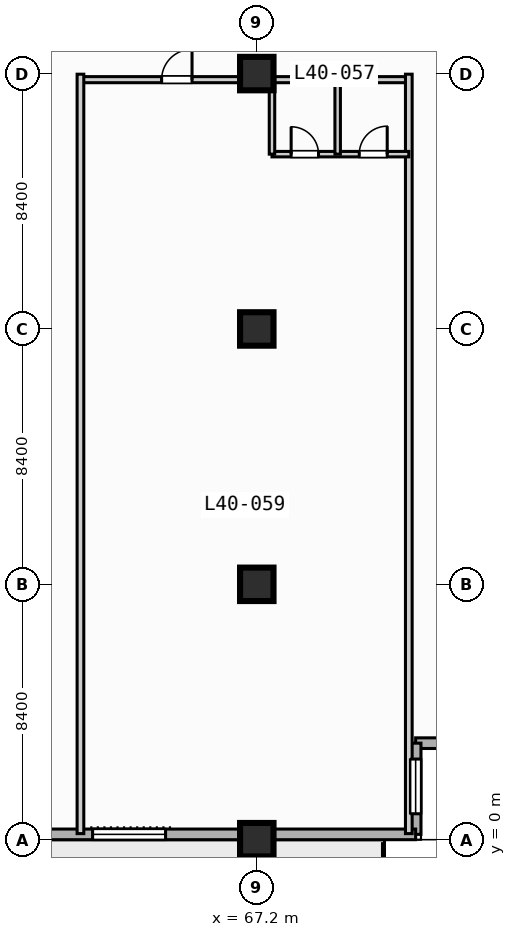
"""IFC4 building model, lengths in metres.
Left out: names, types, materials, properties, quantities, classifications, styles, units other than length and angle.
Written with IfcOpenShell. Run it as: python <this file> out.ifc"""

import sys

from ifc_helpers import new_model, si_unit, direction, frame, frame_2d, origin, origin_2d, place, context, subcontext, project, spatial, rectangle, extrude, element, fill, save


model = new_model("IFC4")
c1 = context("Model", 3, precision=1e-05, world=origin(), true_north=direction((0.0, 1.0)))
c2 = subcontext(c1, "Body", "Model", "MODEL_VIEW")
j1 = project(units=[si_unit("LENGTHUNIT", "METRE"), si_unit("PLANEANGLEUNIT", "RADIAN")], contexts=[c1])
p1 = place(None, origin())
s1 = spatial("IfcSite", under=j1, at=p1, CompositionType="ELEMENT")
p2 = place(p1, origin())
s2 = spatial("IfcBuilding", under=s1, at=p2, CompositionType="ELEMENT")
p3 = place(p2, frame((0.0, 0.0, 168.0)))
s3 = spatial("IfcBuildingStorey", under=s2, at=p3, CompositionType="ELEMENT", Elevation=168.0)
for number, where, z_axis, x_axis in (
    (1, (67.2, 0.0, 0.0), (0.0, 0.0, 1.0), (1.0, 0.0, 0.0)),
    (2, (67.2, 8.4, 0.0), (0.0, 0.0, 1.0), (1.0, 0.0, 0.0)),
    (3, (67.2, 16.8, 0.0), (0.0, 0.0, 1.0), (1.0, 0.0, 0.0)),
    (4, (67.2, 25.2, 0.0), (0.0, 0.0, 1.0), (1.0, 0.0, 0.0)),
):
    element("IfcColumn", number, at=place(p3, frame(where, z_axis=z_axis, x_axis=x_axis)), inside=s3, PredefinedType="COLUMN", context=c2, shape_type="SweptSolid", body=[
        extrude(rectangle(XDim=1.1, YDim=1.1, at=origin_2d()), origin(), (0.0, 0.0, 1.0), 3.7),
    ])
p4 = place(p3, frame((75.425, 3.175, 0.0), z_axis=(0.0, 0.0, 1.0), x_axis=(-1.0, 0.0, 0.0)))
e5 = element("IfcWall", 5, at=p4, inside=s3, PredefinedType="STANDARD", context=c2, shape_type="SweptSolid", body=[
    extrude(rectangle(XDim=3.0, YDim=0.35, at=frame_2d((1.5, 0.0))), origin(), (0.0, 0.0, 1.0), 3.47),
])
p5 = place(p3, frame((72.425, 3.175, 0.0), z_axis=(0.0, 0.0, 1.0), x_axis=(0.0, -1.0, 0.0)))
e6 = element("IfcWall", 6, at=p5, inside=s3, PredefinedType="STANDARD", context=c2, shape_type="SweptSolid", body=[
    extrude(rectangle(XDim=3.0, YDim=0.35, at=frame_2d((1.5, 0.0))), origin(), (0.0, 0.0, 1.0), 3.47),
])
p6 = place(p5, frame((0.522, 0.0, 0.85)))
e7 = element("IfcOpeningElement", 7, at=p6, cuts=e6, PredefinedType="OPENING", context=c2, shape_type="SweptSolid", body=[
    extrude(rectangle(XDim=1.8, YDim=1.8, at=frame_2d((0.9, 0.9))), frame((0.0, 0.185, 0.0), z_axis=(0.0, -1.0, 0.0), x_axis=(1.0, 0.0, 0.0)), (0.0, 0.0, 1.0), 0.37),
])
p7 = place(p3, frame((72.425, 0.175, 0.0), z_axis=(0.0, 0.0, 1.0), x_axis=(-1.0, 0.0, 0.0)))
e8 = element("IfcWall", 8, at=p7, inside=s3, PredefinedType="STANDARD", context=c2, shape_type="SweptSolid", body=[
    extrude(rectangle(XDim=69.25, YDim=0.35, at=frame_2d((34.625, 0.0))), origin(), (0.0, 0.0, 1.0), 3.47),
])
p8 = place(p7, frame((51.725, 0.0, 0.0)))
e9 = element("IfcOpeningElement", 9, at=p8, cuts=e8, PredefinedType="OPENING", context=c2, shape_type="SweptSolid", body=[
    extrude(rectangle(XDim=1.4, YDim=2.2, at=frame_2d((0.7, 1.1))), frame((0.0, 0.185, 0.0), z_axis=(0.0, -1.0, 0.0), x_axis=(1.0, 0.0, 0.0)), (0.0, 0.0, 1.0), 0.37),
])
p9 = place(p7, frame((33.725, 0.0, 0.85)))
e10 = element("IfcOpeningElement", 10, at=p9, cuts=e8, PredefinedType="OPENING", context=c2, shape_type="SweptSolid", body=[
    extrude(rectangle(XDim=1.8, YDim=1.8, at=frame_2d((0.9, 0.9))), frame((0.0, 0.185, 0.0), z_axis=(0.0, -1.0, 0.0), x_axis=(1.0, 0.0, 0.0)), (0.0, 0.0, 1.0), 0.37),
])
p10 = place(p7, frame((25.025, 0.0, 0.85)))
e11 = element("IfcOpeningElement", 11, at=p10, cuts=e8, PredefinedType="OPENING", context=c2, shape_type="SweptSolid", body=[
    extrude(rectangle(XDim=2.4, YDim=1.95, at=frame_2d((1.2, 0.975))), frame((0.0, 0.185, 0.0), z_axis=(0.0, -1.0, 0.0), x_axis=(1.0, 0.0, 0.0)), (0.0, 0.0, 1.0), 0.37),
])
p11 = place(p7, frame((8.225, 0.0, 0.85)))
e12 = element("IfcOpeningElement", 12, at=p11, cuts=e8, PredefinedType="OPENING", context=c2, shape_type="SweptSolid", body=[
    extrude(rectangle(XDim=2.4, YDim=1.95, at=frame_2d((1.2, 0.975))), frame((0.0, 0.185, 0.0), z_axis=(0.0, -1.0, 0.0), x_axis=(1.0, 0.0, 0.0)), (0.0, 0.0, 1.0), 0.37),
])
p12 = place(p7, frame((64.725, 0.0, 0.85)))
e13 = element("IfcOpeningElement", 13, at=p12, cuts=e8, PredefinedType="OPENING", context=c2, shape_type="SweptSolid", body=[
    extrude(rectangle(XDim=1.8, YDim=1.8, at=frame_2d((0.9, 0.9))), frame((0.0, 0.185, 0.0), z_axis=(0.0, -1.0, 0.0), x_axis=(1.0, 0.0, 0.0)), (0.0, 0.0, 1.0), 0.37),
])
p13 = place(p7, frame((44.675, 0.0, 0.85)))
e14 = element("IfcOpeningElement", 14, at=p13, cuts=e8, PredefinedType="OPENING", context=c2, shape_type="SweptSolid", body=[
    extrude(rectangle(XDim=1.8, YDim=1.8, at=frame_2d((0.9, 0.9))), frame((0.0, 0.185, 0.0), z_axis=(0.0, -1.0, 0.0), x_axis=(1.0, 0.0, 0.0)), (0.0, 0.0, 1.0), 0.37),
])
p14 = place(p3, frame((61.4, 25.0, 0.0), z_axis=(0.0, 0.0, 1.0), x_axis=(1.0, 0.0, 0.0)))
e15 = element("IfcWall", 15, at=p14, inside=s3, PredefinedType="PARTITIONING", context=c2, shape_type="SweptSolid", body=[
    extrude(rectangle(XDim=10.8, YDim=0.2, at=frame_2d((5.4, 0.0))), origin(), (0.0, 0.0, 1.0), 2.82),
])
p15 = place(p14, frame((2.67, 0.0, 0.0)))
e16 = element("IfcOpeningElement", 16, at=p15, cuts=e15, PredefinedType="OPENING", context=c2, shape_type="SweptSolid", body=[
    extrude(rectangle(XDim=1.0, YDim=2.15, at=frame_2d((0.5, 1.075))), frame((0.0, 0.11, 0.0), z_axis=(0.0, -1.0, 0.0), x_axis=(1.0, 0.0, 0.0)), (0.0, 0.0, 1.0), 0.22),
])
for number, where, z_axis, x_axis in (
    (17, (61.4, 0.2, 0.0), (0.0, 0.0, 1.0), (0.0, 1.0, 0.0)),
    (18, (72.2, 0.2, 0.0), (0.0, 0.0, 1.0), (0.0, 1.0, 0.0)),
):
    element("IfcWall", number, at=place(p3, frame(where, z_axis=z_axis, x_axis=x_axis)), inside=s3, PredefinedType="PARTITIONING", context=c2, shape_type="SweptSolid", body=[
        extrude(rectangle(XDim=24.98, YDim=0.22, at=frame_2d((12.49, 0.0))), origin(), (0.0, 0.0, 1.0), 3.47),
    ])
p16 = place(p3, frame((67.7, 22.55, 0.0), z_axis=(0.0, 0.0, 1.0), x_axis=(1.0, 0.0, 0.0)))
e19 = element("IfcWall", 19, at=p16, inside=s3, PredefinedType="PLUMBINGWALL", context=c2, shape_type="SweptSolid", body=[
    extrude(rectangle(XDim=4.5, YDim=0.18, at=frame_2d((2.25, 0.0))), origin(), (0.0, 0.0, 1.0), 3.47),
])
p17 = place(p16, frame((0.63, 0.0, 0.0)))
e20 = element("IfcOpeningElement", 20, at=p17, cuts=e19, PredefinedType="OPENING", context=c2, shape_type="SweptSolid", body=[
    extrude(rectangle(XDim=0.9, YDim=2.1, at=frame_2d((0.45, 1.05))), frame((0.0, 0.1, 0.0), z_axis=(0.0, -1.0, 0.0), x_axis=(1.0, 0.0, 0.0)), (0.0, 0.0, 1.0), 0.2),
])
p18 = place(p16, frame((2.87, 0.0, 0.0)))
e21 = element("IfcOpeningElement", 21, at=p18, cuts=e19, PredefinedType="OPENING", context=c2, shape_type="SweptSolid", body=[
    extrude(rectangle(XDim=0.92, YDim=2.1, at=frame_2d((0.46, 1.05))), frame((0.0, 0.1, 0.0), z_axis=(0.0, -1.0, 0.0), x_axis=(1.0, 0.0, 0.0)), (0.0, 0.0, 1.0), 0.2),
])
for number, where, z_axis, x_axis in (
    (22, (67.7, 22.55, 0.0), (0.0, 0.0, 1.0), (0.0, 1.0, 0.0)),
    (23, (69.86, 22.55, 0.0), (0.0, 0.0, 1.0), (0.0, 1.0, 0.0)),
):
    element("IfcWall", number, at=place(p3, frame(where, z_axis=z_axis, x_axis=x_axis)), inside=s3, PredefinedType="PLUMBINGWALL", context=c2, shape_type="SweptSolid", body=[
        extrude(rectangle(XDim=2.45, YDim=0.18, at=frame_2d((1.225, 0.0))), origin(), (0.0, 0.0, 1.0), 3.47),
    ])
p19 = place(p6, origin())
e24 = element("IfcWindow", 24, at=p19, inside=s3, PartitioningType="SINGLE_PANEL", PredefinedType="WINDOW", context=c2, shape_type="SweptSolid", body=[
    extrude(rectangle(XDim=1.8, YDim=1.8, at=frame_2d((0.9, 0.9))), frame((0.0, 0.03, 0.0), z_axis=(0.0, -1.0, 0.0), x_axis=(1.0, 0.0, 0.0)), (0.0, 0.0, 1.0), 0.06),
])
fill(e7, e24)
p20 = place(p11, origin())
e25 = element("IfcWindow", 25, at=p20, inside=s3, PartitioningType="SINGLE_PANEL", PredefinedType="WINDOW", context=c2, shape_type="SweptSolid", body=[
    extrude(rectangle(XDim=2.4, YDim=1.95, at=frame_2d((1.2, 0.975))), frame((0.0, 0.03, 0.0), z_axis=(0.0, -1.0, 0.0), x_axis=(1.0, 0.0, 0.0)), (0.0, 0.0, 1.0), 0.06),
])
fill(e12, e25)
p21 = place(p15, origin())
e26 = element("IfcDoor", 26, at=p21, inside=s3, OperationType="SINGLE_SWING_RIGHT", PredefinedType="DOOR", context=c2, shape_type="SweptSolid", body=[
    extrude(rectangle(XDim=1.0, YDim=2.15, at=frame_2d((0.5, 1.075))), frame((0.0, 0.025, 0.0), z_axis=(0.0, -1.0, 0.0), x_axis=(1.0, 0.0, 0.0)), (0.0, 0.0, 1.0), 0.05),
])
fill(e16, e26)
p22 = place(p17, origin())
e27 = element("IfcDoor", 27, at=p22, inside=s3, OperationType="SINGLE_SWING_LEFT", PredefinedType="DOOR", context=c2, shape_type="SweptSolid", body=[
    extrude(rectangle(XDim=0.9, YDim=2.1, at=frame_2d((0.45, 1.05))), frame((0.0, 0.025, 0.0), z_axis=(0.0, -1.0, 0.0), x_axis=(1.0, 0.0, 0.0)), (0.0, 0.0, 1.0), 0.05),
])
fill(e20, e27)
p23 = place(p18, origin())
e28 = element("IfcDoor", 28, at=p23, inside=s3, OperationType="SINGLE_SWING_RIGHT", PredefinedType="DOOR", context=c2, shape_type="SweptSolid", body=[
    extrude(rectangle(XDim=0.92, YDim=2.1, at=frame_2d((0.46, 1.05))), frame((0.0, 0.025, 0.0), z_axis=(0.0, -1.0, 0.0), x_axis=(1.0, 0.0, 0.0)), (0.0, 0.0, 1.0), 0.05),
])
fill(e21, e28)
save(model, sys.argv[1])
